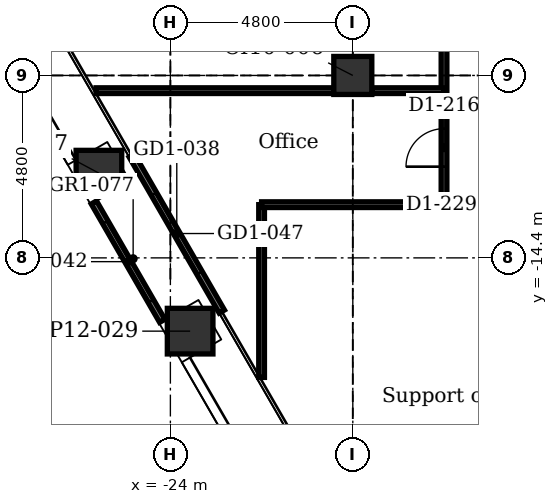
"""IFC4 building model, lengths in metres.
Left out: names, types, materials, properties, quantities, classifications, styles, units other than length and angle.
Written with IfcOpenShell. Run it as: python <this file> out.ifc"""

import sys

from ifc_helpers import new_model, si_unit, direction, frame, frame_2d, origin, origin_2d, place, context, subcontext, project, spatial, rectangle, extrude, element, fill, save


model = new_model("IFC4")
c1 = context("Model", 3, precision=1e-05, world=origin(), true_north=direction((0.0, 1.0)))
c2 = subcontext(c1, "Body", "Model", "MODEL_VIEW")
j1 = project(units=[si_unit("LENGTHUNIT", "METRE"), si_unit("PLANEANGLEUNIT", "RADIAN")], contexts=[c1])
p1 = place(None, origin())
s1 = spatial("IfcSite", under=j1, at=p1, CompositionType="ELEMENT")
p2 = place(p1, origin())
s2 = spatial("IfcBuilding", under=s1, at=p2, CompositionType="ELEMENT")
p3 = place(p2, frame((0.0, 0.0, 77.9)))
s3 = spatial("IfcBuildingStorey", under=s2, at=p3, CompositionType="ELEMENT", Elevation=77.9)
for number, where, z_axis, x_axis in (
    (1, (-23.48, -16.328, -0.2), (0.0, 0.0, 1.0), (0.866, 0.5, 0.0)),
    (2, (-25.88, -12.171, -0.2), (0.0, 0.0, 1.0), (0.866, 0.5, 0.0)),
):
    element("IfcColumn", number, at=place(p3, frame(where, z_axis=z_axis, x_axis=x_axis)), inside=s3, PredefinedType="COLUMN", context=c2, shape_type="SweptSolid", body=[
        extrude(rectangle(XDim=1.2, YDim=1.2, at=origin_2d()), origin(), (0.0, 0.0, 1.0), 4.5),
    ])
p4 = place(p3, frame((-19.2, -9.6, -0.2), z_axis=(0.0, 0.0, 1.0), x_axis=(1.0, 0.0, 0.0)))
e3 = element("IfcColumn", 3, at=p4, inside=s3, PredefinedType="COLUMN", context=c2, shape_type="SweptSolid", body=[
    extrude(rectangle(XDim=1.0, YDim=1.0, at=origin_2d()), origin(), (0.0, 0.0, 1.0), 4.5),
])
p5 = place(p3, frame((-22.647, -15.812, 0.0), z_axis=(0.0, 0.0, 1.0), x_axis=(-0.499978080042, 0.866038058908, 0.0)))
e4 = element("IfcWall", 4, at=p5, inside=s3, PredefinedType="PARTITIONING", context=c2, shape_type="SweptSolid", body=[
    extrude(rectangle(XDim=4.74, YDim=0.16, at=frame_2d((2.37, 0.0))), origin(), (0.0, 0.0, 1.0), 4.3),
])
p6 = place(p5, frame((1.17, 0.0, 0.0)))
e5 = element("IfcOpeningElement", 5, at=p6, cuts=e4, PredefinedType="OPENING", context=c2, shape_type="SweptSolid", body=[
    extrude(rectangle(XDim=2.4, YDim=2.4, at=frame_2d((1.2, 1.2))), frame((0.0, 0.09, 0.0), z_axis=(0.0, -1.0, 0.0), x_axis=(1.0, 0.0, 0.0)), (0.0, 0.0, 1.0), 0.18),
])
p7 = place(p3, frame((-24.214, -16.056, 0.0), z_axis=(0.0, 0.0, 1.0), x_axis=(-0.500016292001, 0.866015997389, 0.0)))
e6 = element("IfcWall", 6, at=p7, inside=s3, PredefinedType="PARTITIONING", context=c2, shape_type="SweptSolid", body=[
    extrude(rectangle(XDim=3.596, YDim=0.16, at=frame_2d((1.798, 0.0))), origin(), (0.0, 0.0, 1.0), 3.2),
])
p8 = place(p7, frame((0.598, 0.0, 0.0)))
e7 = element("IfcOpeningElement", 7, at=p8, cuts=e6, PredefinedType="OPENING", context=c2, shape_type="SweptSolid", body=[
    extrude(rectangle(XDim=2.4, YDim=2.4, at=frame_2d((1.2, 1.2))), frame((0.0, 0.09, 0.0), z_axis=(0.0, -1.0, 0.0), x_axis=(1.0, 0.0, 0.0)), (0.0, 0.0, 1.0), 0.18),
])
p9 = place(p3, frame((-16.8, -13.0, 0.0), z_axis=(0.0, 0.0, 1.0), x_axis=(0.0, 1.0, 0.0)))
e8 = element("IfcWall", 8, at=p9, inside=s3, PredefinedType="PARTITIONING", context=c2, shape_type="SweptSolid", body=[
    extrude(rectangle(XDim=9.05, YDim=0.15, at=frame_2d((4.525, 0.0))), origin(), (0.0, 0.0, 1.0), 4.3),
])
p10 = place(p9, frame((1.0, 0.0, 0.0)))
e9 = element("IfcOpeningElement", 9, at=p10, cuts=e8, PredefinedType="OPENING", context=c2, shape_type="SweptSolid", body=[
    extrude(rectangle(XDim=1.0, YDim=2.1, at=frame_2d((0.5, 1.05))), frame((0.0, 0.085, 0.0), z_axis=(0.0, -1.0, 0.0), x_axis=(1.0, 0.0, 0.0)), (0.0, 0.0, 1.0), 0.17),
])
p11 = place(p9, frame((5.8, 0.0, 0.0)))
e10 = element("IfcOpeningElement", 10, at=p11, cuts=e8, PredefinedType="OPENING", context=c2, shape_type="SweptSolid", body=[
    extrude(rectangle(XDim=1.0, YDim=2.1, at=frame_2d((0.5, 1.05))), frame((0.0, 0.085, 0.0), z_axis=(0.0, -1.0, 0.0), x_axis=(1.0, 0.0, 0.0)), (0.0, 0.0, 1.0), 0.17),
])
p12 = place(p3, frame((-21.6, -17.545, 0.0), z_axis=(0.0, 0.0, 1.0), x_axis=(0.0, 1.0, 0.0)))
e11 = element("IfcWall", 11, at=p12, inside=s3, PredefinedType="PARTITIONING", context=c2, shape_type="SweptSolid", body=[
    extrude(rectangle(XDim=4.545, YDim=0.15, at=frame_2d((2.272, 0.0))), origin(), (0.0, 0.0, 1.0), 4.3),
])
p13 = place(p3, frame((-21.6, -13.0, 0.0), z_axis=(0.0, 0.0, 1.0), x_axis=(1.0, 0.0, 0.0)))
e12 = element("IfcWall", 12, at=p13, inside=s3, PredefinedType="PARTITIONING", context=c2, shape_type="SweptSolid", body=[
    extrude(rectangle(XDim=38.4, YDim=0.15, at=frame_2d((19.2, 0.0))), origin(), (0.0, 0.0, 1.0), 4.3),
])
p14 = place(p13, frame((6.265, 0.0, 0.0)))
e13 = element("IfcOpeningElement", 13, at=p14, cuts=e12, PredefinedType="OPENING", context=c2, shape_type="SweptSolid", body=[
    extrude(rectangle(XDim=1.0, YDim=2.1, at=frame_2d((0.5, 1.05))), frame((0.0, 0.085, 0.0), z_axis=(0.0, -1.0, 0.0), x_axis=(1.0, 0.0, 0.0)), (0.0, 0.0, 1.0), 0.17),
])
p15 = place(p13, frame((10.3, 0.0, 0.0)))
e14 = element("IfcOpeningElement", 14, at=p15, cuts=e12, PredefinedType="OPENING", context=c2, shape_type="SweptSolid", body=[
    extrude(rectangle(XDim=1.0, YDim=2.1, at=frame_2d((0.5, 1.05))), frame((0.0, 0.085, 0.0), z_axis=(0.0, -1.0, 0.0), x_axis=(1.0, 0.0, 0.0)), (0.0, 0.0, 1.0), 0.17),
])
p16 = place(p13, frame((13.9, 0.0, 0.0)))
e15 = element("IfcOpeningElement", 15, at=p16, cuts=e12, PredefinedType="OPENING", context=c2, shape_type="SweptSolid", body=[
    extrude(rectangle(XDim=1.0, YDim=2.1, at=frame_2d((0.5, 1.05))), frame((0.0, 0.085, 0.0), z_axis=(0.0, -1.0, 0.0), x_axis=(1.0, 0.0, 0.0)), (0.0, 0.0, 1.0), 0.17),
])
p17 = place(p13, frame((18.7, 0.0, 0.0)))
e16 = element("IfcOpeningElement", 16, at=p17, cuts=e12, PredefinedType="OPENING", context=c2, shape_type="SweptSolid", body=[
    extrude(rectangle(XDim=1.0, YDim=2.1, at=frame_2d((0.5, 1.05))), frame((0.0, 0.085, 0.0), z_axis=(0.0, -1.0, 0.0), x_axis=(1.0, 0.0, 0.0)), (0.0, 0.0, 1.0), 0.17),
])
p18 = place(p13, frame((28.815, 0.0, 0.0)))
e17 = element("IfcOpeningElement", 17, at=p18, cuts=e12, PredefinedType="OPENING", context=c2, shape_type="SweptSolid", body=[
    extrude(rectangle(XDim=1.0, YDim=2.1, at=frame_2d((0.5, 1.05))), frame((0.0, 0.085, 0.0), z_axis=(0.0, -1.0, 0.0), x_axis=(1.0, 0.0, 0.0)), (0.0, 0.0, 1.0), 0.17),
])
p19 = place(p13, frame((35.095, 0.0, 0.0)))
e18 = element("IfcOpeningElement", 18, at=p19, cuts=e12, PredefinedType="OPENING", context=c2, shape_type="SweptSolid", body=[
    extrude(rectangle(XDim=1.0, YDim=2.1, at=frame_2d((0.5, 1.05))), frame((0.0, 0.085, 0.0), z_axis=(0.0, -1.0, 0.0), x_axis=(1.0, 0.0, 0.0)), (0.0, 0.0, 1.0), 0.17),
])
p20 = place(p13, frame((23.55, 0.0, 0.0)))
e19 = element("IfcOpeningElement", 19, at=p20, cuts=e12, PredefinedType="OPENING", context=c2, shape_type="SweptSolid", body=[
    extrude(rectangle(XDim=0.9, YDim=2.1, at=frame_2d((0.45, 1.05))), frame((0.0, 0.085, 0.0), z_axis=(0.0, -1.0, 0.0), x_axis=(1.0, 0.0, 0.0)), (0.0, 0.0, 1.0), 0.17),
])
p21 = place(p13, frame((26.55, 0.0, 0.0)))
e20 = element("IfcOpeningElement", 20, at=p21, cuts=e12, PredefinedType="OPENING", context=c2, shape_type="SweptSolid", body=[
    extrude(rectangle(XDim=0.9, YDim=2.1, at=frame_2d((0.45, 1.05))), frame((0.0, 0.085, 0.0), z_axis=(0.0, -1.0, 0.0), x_axis=(1.0, 0.0, 0.0)), (0.0, 0.0, 1.0), 0.17),
])
p22 = place(p13, frame((32.2, 0.0, 0.9)))
e21 = element("IfcOpeningElement", 21, at=p22, cuts=e12, PredefinedType="OPENING", context=c2, shape_type="SweptSolid", body=[
    extrude(rectangle(XDim=1.8, YDim=1.5, at=frame_2d((0.9, 0.75))), frame((0.0, 0.085, 0.0), z_axis=(0.0, -1.0, 0.0), x_axis=(1.0, 0.0, 0.0)), (0.0, 0.0, 1.0), 0.17),
])
p23 = place(p3, frame((-25.956, -10.0, 0.0), z_axis=(0.0, 0.0, 1.0), x_axis=(1.0, 0.0, 0.0)))
e22 = element("IfcWall", 22, at=p23, inside=s3, PredefinedType="PARTITIONING", context=c2, shape_type="SweptSolid", body=[
    extrude(rectangle(XDim=6.256, YDim=0.15, at=frame_2d((3.128, 0.0))), origin(), (0.0, 0.0, 1.0), 4.3),
])
p24 = place(p3, frame((-18.7, -10.0, 0.0), z_axis=(0.0, 0.0, 1.0), x_axis=(1.0, 0.0, 0.0)))
e23 = element("IfcWall", 23, at=p24, inside=s3, PredefinedType="PARTITIONING", context=c2, shape_type="SweptSolid", body=[
    extrude(rectangle(XDim=1.9, YDim=0.15, at=frame_2d((0.95, 0.0))), origin(), (0.0, 0.0, 1.0), 4.3),
])
p25 = place(p6, origin())
e24 = element("IfcDoor", 24, at=p25, inside=s3, OperationType="DOUBLE_DOOR_SLIDING", PredefinedType="DOOR", context=c2, shape_type="SweptSolid", body=[
    extrude(rectangle(XDim=2.4, YDim=2.4, at=frame_2d((1.2, 1.2))), frame((0.0, 0.025, 0.0), z_axis=(0.0, -1.0, 0.0), x_axis=(1.0, 0.0, 0.0)), (0.0, 0.0, 1.0), 0.05),
])
fill(e5, e24)
p26 = place(p8, origin())
e25 = element("IfcDoor", 25, at=p26, inside=s3, OperationType="DOUBLE_DOOR_SLIDING", PredefinedType="DOOR", context=c2, shape_type="SweptSolid", body=[
    extrude(rectangle(XDim=2.4, YDim=2.4, at=frame_2d((1.2, 1.2))), frame((0.0, 0.025, 0.0), z_axis=(0.0, -1.0, 0.0), x_axis=(1.0, 0.0, 0.0)), (0.0, 0.0, 1.0), 0.05),
])
fill(e7, e25)
p27 = place(p10, origin())
e26 = element("IfcDoor", 26, at=p27, inside=s3, OperationType="SINGLE_SWING_LEFT", PredefinedType="DOOR", context=c2, shape_type="SweptSolid", body=[
    extrude(rectangle(XDim=1.0, YDim=2.1, at=frame_2d((0.5, 1.05))), frame((0.0, 0.025, 0.0), z_axis=(0.0, -1.0, 0.0), x_axis=(1.0, 0.0, 0.0)), (0.0, 0.0, 1.0), 0.05),
])
fill(e9, e26)
save(model, sys.argv[1])
